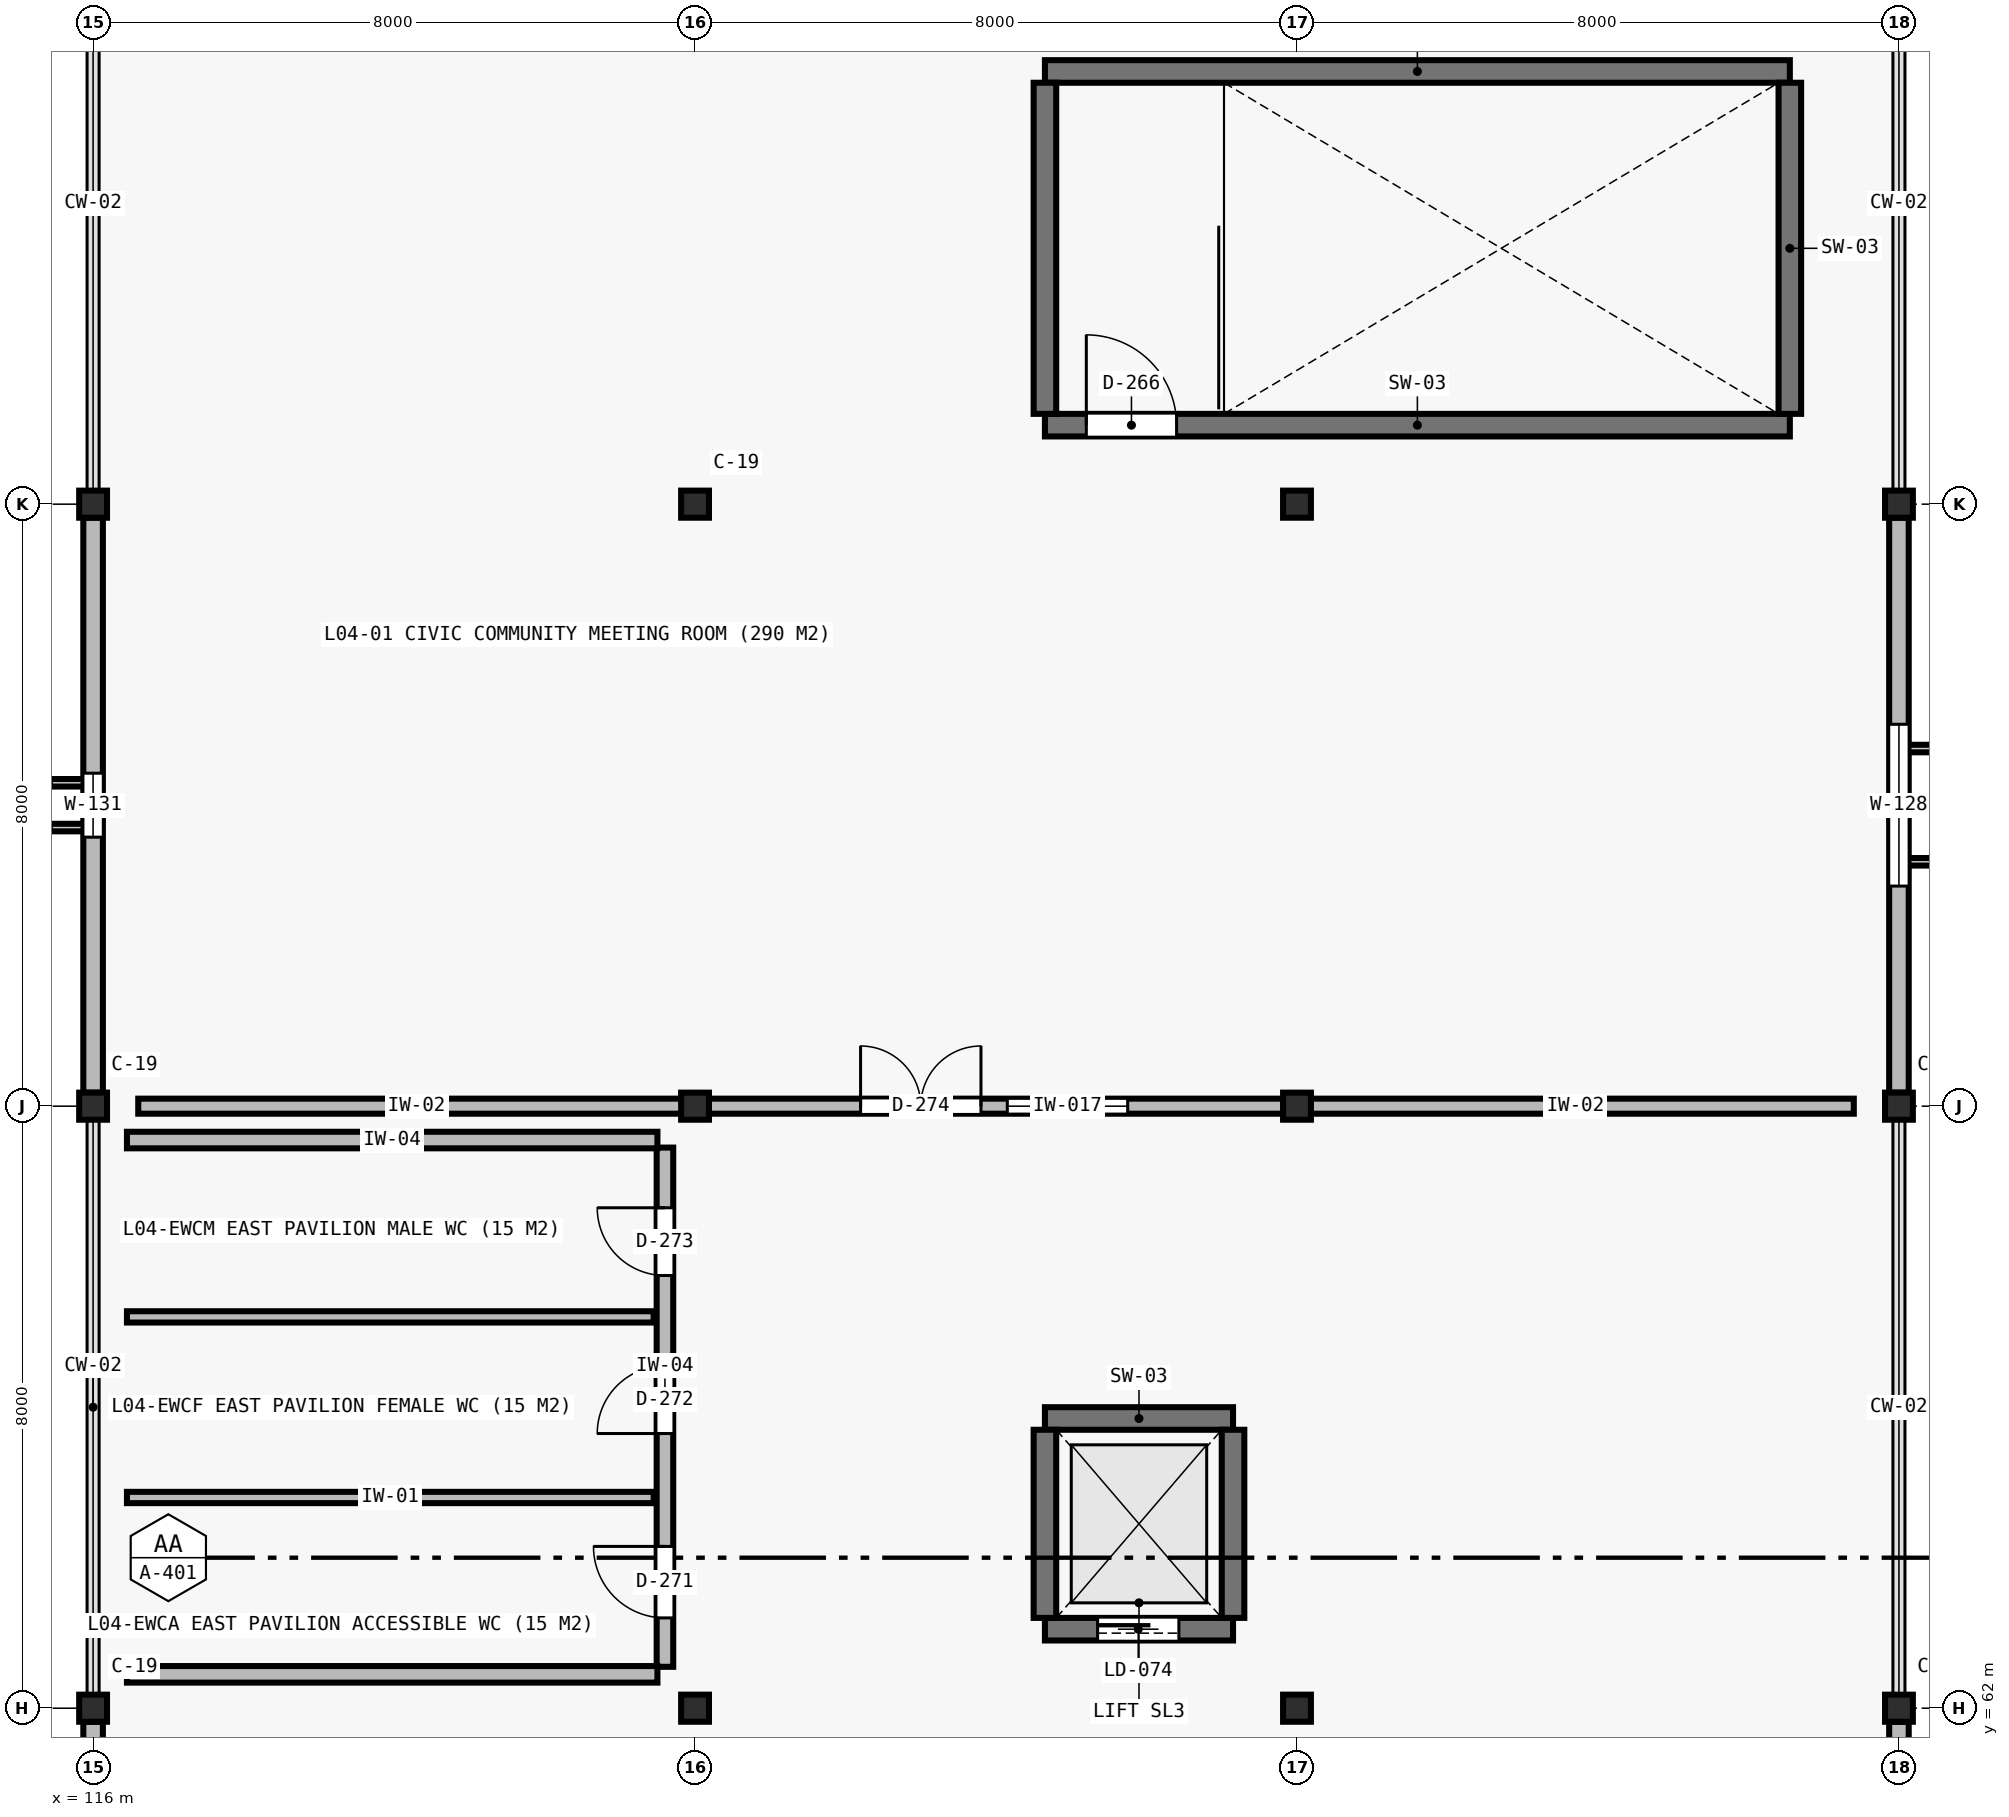
"""IFC4 building model, lengths in metres.
Left out: names, types, materials, properties, quantities, classifications, styles, units other than length and angle.
Written with IfcOpenShell. Run it as: python <this file> out.ifc"""

import sys

from ifc_helpers import new_model, si_unit, direction, frame, frame_2d, origin, origin_2d, place, context, subcontext, project, spatial, rectangle, i_section, extrude, element, fill, save


model = new_model("IFC4")
c1 = context("Model", 3, precision=1e-05, world=origin(), true_north=direction((0.0, 1.0)))
c2 = subcontext(c1, "Body", "Model", "MODEL_VIEW")
j1 = project(units=[si_unit("LENGTHUNIT", "METRE"), si_unit("PLANEANGLEUNIT", "RADIAN")], contexts=[c1])
p1 = place(None, origin())
s1 = spatial("IfcSite", under=j1, at=p1, CompositionType="ELEMENT")
p2 = place(p1, origin())
s2 = spatial("IfcBuilding", under=s1, at=p2, CompositionType="ELEMENT")
p3 = place(p2, frame((0.0, 0.0, 19.6)))
s3 = spatial("IfcBuildingStorey", under=s2, at=p3, CompositionType="ELEMENT", Elevation=19.6)
for number, where, z_axis, x_axis in (
    (1, (116.0, 62.0, 0.0), (0.0, 0.0, 1.0), (1.0, 0.0, 0.0)),
    (2, (116.0, 70.0, 0.0), (0.0, 0.0, 1.0), (1.0, 0.0, 0.0)),
    (3, (116.0, 78.0, 0.0), (0.0, 0.0, 1.0), (1.0, 0.0, 0.0)),
    (4, (124.0, 62.0, 0.0), (0.0, 0.0, 1.0), (1.0, 0.0, 0.0)),
    (5, (124.0, 70.0, 0.0), (0.0, 0.0, 1.0), (1.0, 0.0, 0.0)),
    (6, (124.0, 78.0, 0.0), (0.0, 0.0, 1.0), (1.0, 0.0, 0.0)),
    (7, (132.0, 62.0, 0.0), (0.0, 0.0, 1.0), (1.0, 0.0, 0.0)),
    (8, (132.0, 70.0, 0.0), (0.0, 0.0, 1.0), (1.0, 0.0, 0.0)),
    (9, (132.0, 78.0, 0.0), (0.0, 0.0, 1.0), (1.0, 0.0, 0.0)),
    (10, (140.0, 62.0, 0.0), (0.0, 0.0, 1.0), (1.0, 0.0, 0.0)),
    (11, (140.0, 70.0, 0.0), (0.0, 0.0, 1.0), (1.0, 0.0, 0.0)),
    (12, (140.0, 78.0, 0.0), (0.0, 0.0, 1.0), (1.0, 0.0, 0.0)),
):
    element("IfcColumn", number, at=place(p3, frame(where, z_axis=z_axis, x_axis=x_axis)), inside=s3, PredefinedType="COLUMN", context=c2, shape_type="SweptSolid", body=[
        extrude(i_section(OverallWidth=0.37, OverallDepth=0.36, WebThickness=0.012, FlangeThickness=0.02, at=origin_2d()), origin(), (0.0, 0.0, 1.0), 4.02),
    ])
p4 = place(p3, frame((128.65, 83.75, 0.0), z_axis=(0.0, 0.0, 1.0), x_axis=(1.0, 0.0, 0.0)))
e13 = element("IfcWall", 13, at=p4, inside=s3, PredefinedType="SHEAR", context=c2, shape_type="SweptSolid", body=[
    extrude(rectangle(XDim=9.9, YDim=0.3, at=frame_2d((4.95, 0.0))), origin(), (0.0, 0.0, 1.0), 4.02),
])
p5 = place(p3, frame((128.65, 79.05, 0.0), z_axis=(0.0, 0.0, 1.0), x_axis=(1.0, 0.0, 0.0)))
e14 = element("IfcWall", 14, at=p5, inside=s3, PredefinedType="SHEAR", context=c2, shape_type="SweptSolid", body=[
    extrude(rectangle(XDim=9.9, YDim=0.3, at=frame_2d((4.95, 0.0))), origin(), (0.0, 0.0, 1.0), 4.02),
])
p6 = place(p5, frame((0.55, 0.0, 0.0)))
e15 = element("IfcOpeningElement", 15, at=p6, cuts=e14, PredefinedType="OPENING", context=c2, shape_type="SweptSolid", body=[
    extrude(rectangle(XDim=1.2, YDim=2.2, at=frame_2d((0.6, 1.1))), frame((0.0, 0.16, 0.0), z_axis=(0.0, -1.0, 0.0), x_axis=(1.0, 0.0, 0.0)), (0.0, 0.0, 1.0), 0.32),
])
for number, where, z_axis, x_axis in (
    (16, (128.65, 79.2, 0.0), (0.0, 0.0, 1.0), (0.0, 1.0, 0.0)),
    (17, (138.55, 79.2, 0.0), (0.0, 0.0, 1.0), (0.0, 1.0, 0.0)),
):
    element("IfcWall", number, at=place(p3, frame(where, z_axis=z_axis, x_axis=x_axis)), inside=s3, PredefinedType="SHEAR", context=c2, shape_type="SweptSolid", body=[
        extrude(rectangle(XDim=4.4, YDim=0.3, at=frame_2d((2.2, 0.0))), origin(), (0.0, 0.0, 1.0), 4.02),
    ])
p7 = place(p3, frame((128.65, 65.85, 0.0), z_axis=(0.0, 0.0, 1.0), x_axis=(1.0, 0.0, 0.0)))
e18 = element("IfcWall", 18, at=p7, inside=s3, PredefinedType="SHEAR", context=c2, shape_type="SweptSolid", body=[
    extrude(rectangle(XDim=2.5, YDim=0.3, at=frame_2d((1.25, 0.0))), origin(), (0.0, 0.0, 1.0), 4.02),
])
p8 = place(p3, frame((128.65, 63.05, 0.0), z_axis=(0.0, 0.0, 1.0), x_axis=(1.0, 0.0, 0.0)))
e19 = element("IfcWall", 19, at=p8, inside=s3, PredefinedType="SHEAR", context=c2, shape_type="SweptSolid", body=[
    extrude(rectangle(XDim=2.5, YDim=0.3, at=frame_2d((1.25, 0.0))), origin(), (0.0, 0.0, 1.0), 4.02),
])
p9 = place(p8, frame((0.7, 0.0, 0.0)))
e20 = element("IfcOpeningElement", 20, at=p9, cuts=e19, PredefinedType="OPENING", context=c2, shape_type="SweptSolid", body=[
    extrude(rectangle(XDim=1.08, YDim=2.2, at=frame_2d((0.54, 1.1))), frame((0.0, 0.16, 0.0), z_axis=(0.0, -1.0, 0.0), x_axis=(1.0, 0.0, 0.0)), (0.0, 0.0, 1.0), 0.32),
])
for number, where, z_axis, x_axis in (
    (21, (128.65, 63.2, 0.0), (0.0, 0.0, 1.0), (0.0, 1.0, 0.0)),
    (22, (131.15, 63.2, 0.0), (0.0, 0.0, 1.0), (0.0, 1.0, 0.0)),
):
    element("IfcWall", number, at=place(p3, frame(where, z_axis=z_axis, x_axis=x_axis)), inside=s3, PredefinedType="SHEAR", context=c2, shape_type="SweptSolid", body=[
        extrude(rectangle(XDim=2.5, YDim=0.3, at=frame_2d((1.25, 0.0))), origin(), (0.0, 0.0, 1.0), 4.02),
    ])
p10 = place(p3, frame((140.0, 77.82, 0.0), z_axis=(0.0, 0.0, 1.0), x_axis=(0.0, -1.0, 0.0)))
e23 = element("IfcWall", 23, at=p10, inside=s3, PredefinedType="STANDARD", context=c2, shape_type="SweptSolid", body=[
    extrude(rectangle(XDim=7.64, YDim=0.26, at=frame_2d((3.82, 0.0))), origin(), (0.0, 0.0, 1.0), 3.56),
])
p11 = place(p10, frame((2.745, 0.0, 0.95)))
e24 = element("IfcOpeningElement", 24, at=p11, cuts=e23, PredefinedType="OPENING", context=c2, shape_type="SweptSolid", body=[
    extrude(rectangle(XDim=2.15, YDim=1.5, at=frame_2d((1.075, 0.75))), frame((0.0, 0.14, 0.0), z_axis=(0.0, -1.0, 0.0), x_axis=(1.0, 0.0, 0.0)), (0.0, 0.0, 1.0), 0.28),
])
p12 = place(p3, frame((140.0, 61.82, 0.0), z_axis=(0.0, 0.0, 1.0), x_axis=(0.0, -1.0, 0.0)))
e25 = element("IfcWall", 25, at=p12, inside=s3, PredefinedType="STANDARD", context=c2, shape_type="SweptSolid", body=[
    extrude(rectangle(XDim=7.64, YDim=0.26, at=frame_2d((3.82, 0.0))), origin(), (0.0, 0.0, 1.0), 3.56),
])
p13 = place(p12, frame((2.745, 0.0, 0.95)))
e26 = element("IfcOpeningElement", 26, at=p13, cuts=e25, PredefinedType="OPENING", context=c2, shape_type="SweptSolid", body=[
    extrude(rectangle(XDim=2.15, YDim=1.5, at=frame_2d((1.075, 0.75))), frame((0.0, 0.14, 0.0), z_axis=(0.0, -1.0, 0.0), x_axis=(1.0, 0.0, 0.0)), (0.0, 0.0, 1.0), 0.28),
])
p14 = place(p3, frame((116.0, 54.18, 0.0), z_axis=(0.0, 0.0, 1.0), x_axis=(0.0, 1.0, 0.0)))
e27 = element("IfcWall", 27, at=p14, inside=s3, PredefinedType="STANDARD", context=c2, shape_type="SweptSolid", body=[
    extrude(rectangle(XDim=7.64, YDim=0.26, at=frame_2d((3.82, 0.0))), origin(), (0.0, 0.0, 1.0), 3.56),
])
p15 = place(p14, frame((2.62, 0.0, 0.95)))
e28 = element("IfcOpeningElement", 28, at=p15, cuts=e27, PredefinedType="OPENING", context=c2, shape_type="SweptSolid", body=[
    extrude(rectangle(XDim=2.4, YDim=1.8, at=frame_2d((1.2, 0.9))), frame((0.0, 0.14, 0.0), z_axis=(0.0, -1.0, 0.0), x_axis=(1.0, 0.0, 0.0)), (0.0, 0.0, 1.0), 0.28),
])
p16 = place(p3, frame((116.0, 70.18, 0.0), z_axis=(0.0, 0.0, 1.0), x_axis=(0.0, 1.0, 0.0)))
e29 = element("IfcWall", 29, at=p16, inside=s3, PredefinedType="STANDARD", context=c2, shape_type="SweptSolid", body=[
    extrude(rectangle(XDim=7.64, YDim=0.26, at=frame_2d((3.82, 0.0))), origin(), (0.0, 0.0, 1.0), 3.56),
])
p17 = place(p16, frame((3.395, 0.0, 0.95)))
e30 = element("IfcOpeningElement", 30, at=p17, cuts=e29, PredefinedType="OPENING", context=c2, shape_type="SweptSolid", body=[
    extrude(rectangle(XDim=0.85, YDim=1.9, at=frame_2d((0.425, 0.95))), frame((0.0, 0.14, 0.0), z_axis=(0.0, -1.0, 0.0), x_axis=(1.0, 0.0, 0.0)), (0.0, 0.0, 1.0), 0.28),
])
p18 = place(p3, frame((123.6, 62.55, 0.0), z_axis=(0.0, 0.0, 1.0), x_axis=(0.0, 1.0, 0.0)))
e31 = element("IfcWall", 31, at=p18, inside=s3, PredefinedType="PLUMBINGWALL", context=c2, shape_type="SweptSolid", body=[
    extrude(rectangle(XDim=6.9, YDim=0.22, at=frame_2d((3.45, 0.0))), origin(), (0.0, 0.0, 1.0), 4.02),
])
p19 = place(p18, frame((0.65, 0.0, 0.0)))
e32 = element("IfcOpeningElement", 32, at=p19, cuts=e31, PredefinedType="OPENING", context=c2, shape_type="SweptSolid", body=[
    extrude(rectangle(XDim=0.95, YDim=2.1, at=frame_2d((0.475, 1.05))), frame((0.0, 0.12, 0.0), z_axis=(0.0, -1.0, 0.0), x_axis=(1.0, 0.0, 0.0)), (0.0, 0.0, 1.0), 0.24),
])
p20 = place(p18, frame((3.1, 0.0, 0.0)))
e33 = element("IfcOpeningElement", 33, at=p20, cuts=e31, PredefinedType="OPENING", context=c2, shape_type="SweptSolid", body=[
    extrude(rectangle(XDim=0.9, YDim=2.1, at=frame_2d((0.45, 1.05))), frame((0.0, 0.12, 0.0), z_axis=(0.0, -1.0, 0.0), x_axis=(1.0, 0.0, 0.0)), (0.0, 0.0, 1.0), 0.24),
])
p21 = place(p18, frame((5.2, 0.0, 0.0)))
e34 = element("IfcOpeningElement", 34, at=p21, cuts=e31, PredefinedType="OPENING", context=c2, shape_type="SweptSolid", body=[
    extrude(rectangle(XDim=0.9, YDim=2.1, at=frame_2d((0.45, 1.05))), frame((0.0, 0.12, 0.0), z_axis=(0.0, -1.0, 0.0), x_axis=(1.0, 0.0, 0.0)), (0.0, 0.0, 1.0), 0.24),
])
for number, where, z_axis, x_axis in (
    (35, (116.45, 69.55, 0.0), (0.0, 0.0, 1.0), (1.0, 0.0, 0.0)),
    (36, (116.45, 62.45, 0.0), (0.0, 0.0, 1.0), (1.0, 0.0, 0.0)),
):
    element("IfcWall", number, at=place(p3, frame(where, z_axis=z_axis, x_axis=x_axis)), inside=s3, PredefinedType="PLUMBINGWALL", context=c2, shape_type="SweptSolid", body=[
        extrude(rectangle(XDim=7.05, YDim=0.22, at=frame_2d((3.525, 0.0))), origin(), (0.0, 0.0, 1.0), 4.02),
    ])
for number, where, z_axis, x_axis in (
    (37, (116.45, 64.8, 0.0), (0.0, 0.0, 1.0), (1.0, 0.0, 0.0)),
    (38, (116.45, 67.2, 0.0), (0.0, 0.0, 1.0), (1.0, 0.0, 0.0)),
):
    element("IfcWall", number, at=place(p3, frame(where, z_axis=z_axis, x_axis=x_axis)), inside=s3, PredefinedType="PARTITIONING", context=c2, shape_type="SweptSolid", body=[
        extrude(rectangle(XDim=7.0, YDim=0.15, at=frame_2d((3.5, 0.0))), origin(), (0.0, 0.0, 1.0), 4.02),
    ])
p22 = place(p3, frame((116.6, 70.0, 0.0), z_axis=(0.0, 0.0, 1.0), x_axis=(1.0, 0.0, 0.0)))
e39 = element("IfcWall", 39, at=p22, inside=s3, PredefinedType="PARTITIONING", context=c2, shape_type="SweptSolid", body=[
    extrude(rectangle(XDim=7.4, YDim=0.2, at=frame_2d((3.7, 0.0))), origin(), (0.0, 0.0, 1.0), 3.61),
])
p23 = place(p3, frame((124.0, 70.0, 0.0), z_axis=(0.0, 0.0, 1.0), x_axis=(1.0, 0.0, 0.0)))
e40 = element("IfcWall", 40, at=p23, inside=s3, PredefinedType="PARTITIONING", context=c2, shape_type="SweptSolid", body=[
    extrude(rectangle(XDim=8.0, YDim=0.2, at=frame_2d((4.0, 0.0))), origin(), (0.0, 0.0, 1.0), 3.487),
])
p24 = place(p23, frame((2.2, 0.0, 0.0)))
e41 = element("IfcOpeningElement", 41, at=p24, cuts=e40, PredefinedType="OPENING", context=c2, shape_type="SweptSolid", body=[
    extrude(rectangle(XDim=1.6, YDim=2.2, at=frame_2d((0.8, 1.1))), frame((0.0, 0.11, 0.0), z_axis=(0.0, -1.0, 0.0), x_axis=(1.0, 0.0, 0.0)), (0.0, 0.0, 1.0), 0.22),
])
p25 = place(p23, frame((4.15, 0.0, 0.95)))
e42 = element("IfcOpeningElement", 42, at=p25, cuts=e40, PredefinedType="OPENING", context=c2, shape_type="SweptSolid", body=[
    extrude(rectangle(XDim=1.6, YDim=1.3, at=frame_2d((0.8, 0.65))), frame((0.0, 0.11, 0.0), z_axis=(0.0, -1.0, 0.0), x_axis=(1.0, 0.0, 0.0)), (0.0, 0.0, 1.0), 0.22),
])
p26 = place(p3, frame((132.0, 70.0, 0.0), z_axis=(0.0, 0.0, 1.0), x_axis=(1.0, 0.0, 0.0)))
e43 = element("IfcWall", 43, at=p26, inside=s3, PredefinedType="PARTITIONING", context=c2, shape_type="SweptSolid", body=[
    extrude(rectangle(XDim=7.4, YDim=0.2, at=frame_2d((3.7, 0.0))), origin(), (0.0, 0.0, 1.0), 3.61),
])
p27 = place(p11, origin())
e44 = element("IfcWindow", 44, at=p27, inside=s3, PartitioningType="SINGLE_PANEL", PredefinedType="WINDOW", context=c2, shape_type="SweptSolid", body=[
    extrude(rectangle(XDim=2.15, YDim=1.5, at=frame_2d((1.075, 0.75))), frame((0.0, 0.03, 0.0), z_axis=(0.0, -1.0, 0.0), x_axis=(1.0, 0.0, 0.0)), (0.0, 0.0, 1.0), 0.06),
])
fill(e24, e44)
p28 = place(p17, origin())
e45 = element("IfcWindow", 45, at=p28, inside=s3, PartitioningType="SINGLE_PANEL", PredefinedType="WINDOW", context=c2, shape_type="SweptSolid", body=[
    extrude(rectangle(XDim=0.85, YDim=1.9, at=frame_2d((0.425, 0.95))), frame((0.0, 0.03, 0.0), z_axis=(0.0, -1.0, 0.0), x_axis=(1.0, 0.0, 0.0)), (0.0, 0.0, 1.0), 0.06),
])
fill(e30, e45)
p29 = place(p6, origin())
e46 = element("IfcDoor", 46, at=p29, inside=s3, OperationType="SINGLE_SWING_LEFT", PredefinedType="DOOR", context=c2, shape_type="SweptSolid", body=[
    extrude(rectangle(XDim=1.2, YDim=2.2, at=frame_2d((0.6, 1.1))), frame((0.0, 0.025, 0.0), z_axis=(0.0, -1.0, 0.0), x_axis=(1.0, 0.0, 0.0)), (0.0, 0.0, 1.0), 0.05),
])
fill(e15, e46)
p30 = place(p9, origin())
e47 = element("IfcDoor", 47, at=p30, inside=s3, OperationType="SLIDING_TO_LEFT", PredefinedType="DOOR", context=c2, shape_type="SweptSolid", body=[
    extrude(rectangle(XDim=1.08, YDim=2.2, at=frame_2d((0.54, 1.1))), frame((0.0, 0.025, 0.0), z_axis=(0.0, -1.0, 0.0), x_axis=(1.0, 0.0, 0.0)), (0.0, 0.0, 1.0), 0.05),
])
fill(e20, e47)
p31 = place(p19, origin())
e48 = element("IfcDoor", 48, at=p31, inside=s3, OperationType="SINGLE_SWING_RIGHT", PredefinedType="DOOR", context=c2, shape_type="SweptSolid", body=[
    extrude(rectangle(XDim=0.95, YDim=2.1, at=frame_2d((0.475, 1.05))), frame((0.0, 0.025, 0.0), z_axis=(0.0, -1.0, 0.0), x_axis=(1.0, 0.0, 0.0)), (0.0, 0.0, 1.0), 0.05),
])
fill(e32, e48)
p32 = place(p20, origin())
e49 = element("IfcDoor", 49, at=p32, inside=s3, OperationType="SINGLE_SWING_LEFT", PredefinedType="DOOR", context=c2, shape_type="SweptSolid", body=[
    extrude(rectangle(XDim=0.9, YDim=2.1, at=frame_2d((0.45, 1.05))), frame((0.0, 0.025, 0.0), z_axis=(0.0, -1.0, 0.0), x_axis=(1.0, 0.0, 0.0)), (0.0, 0.0, 1.0), 0.05),
])
fill(e33, e49)
p33 = place(p21, origin())
e50 = element("IfcDoor", 50, at=p33, inside=s3, OperationType="SINGLE_SWING_RIGHT", PredefinedType="DOOR", context=c2, shape_type="SweptSolid", body=[
    extrude(rectangle(XDim=0.9, YDim=2.1, at=frame_2d((0.45, 1.05))), frame((0.0, 0.025, 0.0), z_axis=(0.0, -1.0, 0.0), x_axis=(1.0, 0.0, 0.0)), (0.0, 0.0, 1.0), 0.05),
])
fill(e34, e50)
p34 = place(p24, origin())
e51 = element("IfcDoor", 51, at=p34, inside=s3, OperationType="DOUBLE_DOOR_SINGLE_SWING", PredefinedType="DOOR", context=c2, shape_type="SweptSolid", body=[
    extrude(rectangle(XDim=1.6, YDim=2.2, at=frame_2d((0.8, 1.1))), frame((0.0, 0.025, 0.0), z_axis=(0.0, -1.0, 0.0), x_axis=(1.0, 0.0, 0.0)), (0.0, 0.0, 1.0), 0.05),
])
fill(e41, e51)
p35 = place(p25, origin())
e52 = element("IfcWindow", 52, at=p35, inside=s3, PartitioningType="SINGLE_PANEL", PredefinedType="WINDOW", context=c2, shape_type="SweptSolid", body=[
    extrude(rectangle(XDim=1.6, YDim=1.3, at=frame_2d((0.8, 0.65))), frame((0.0, 0.03, 0.0), z_axis=(0.0, -1.0, 0.0), x_axis=(1.0, 0.0, 0.0)), (0.0, 0.0, 1.0), 0.06),
])
fill(e42, e52)
save(model, sys.argv[1])
